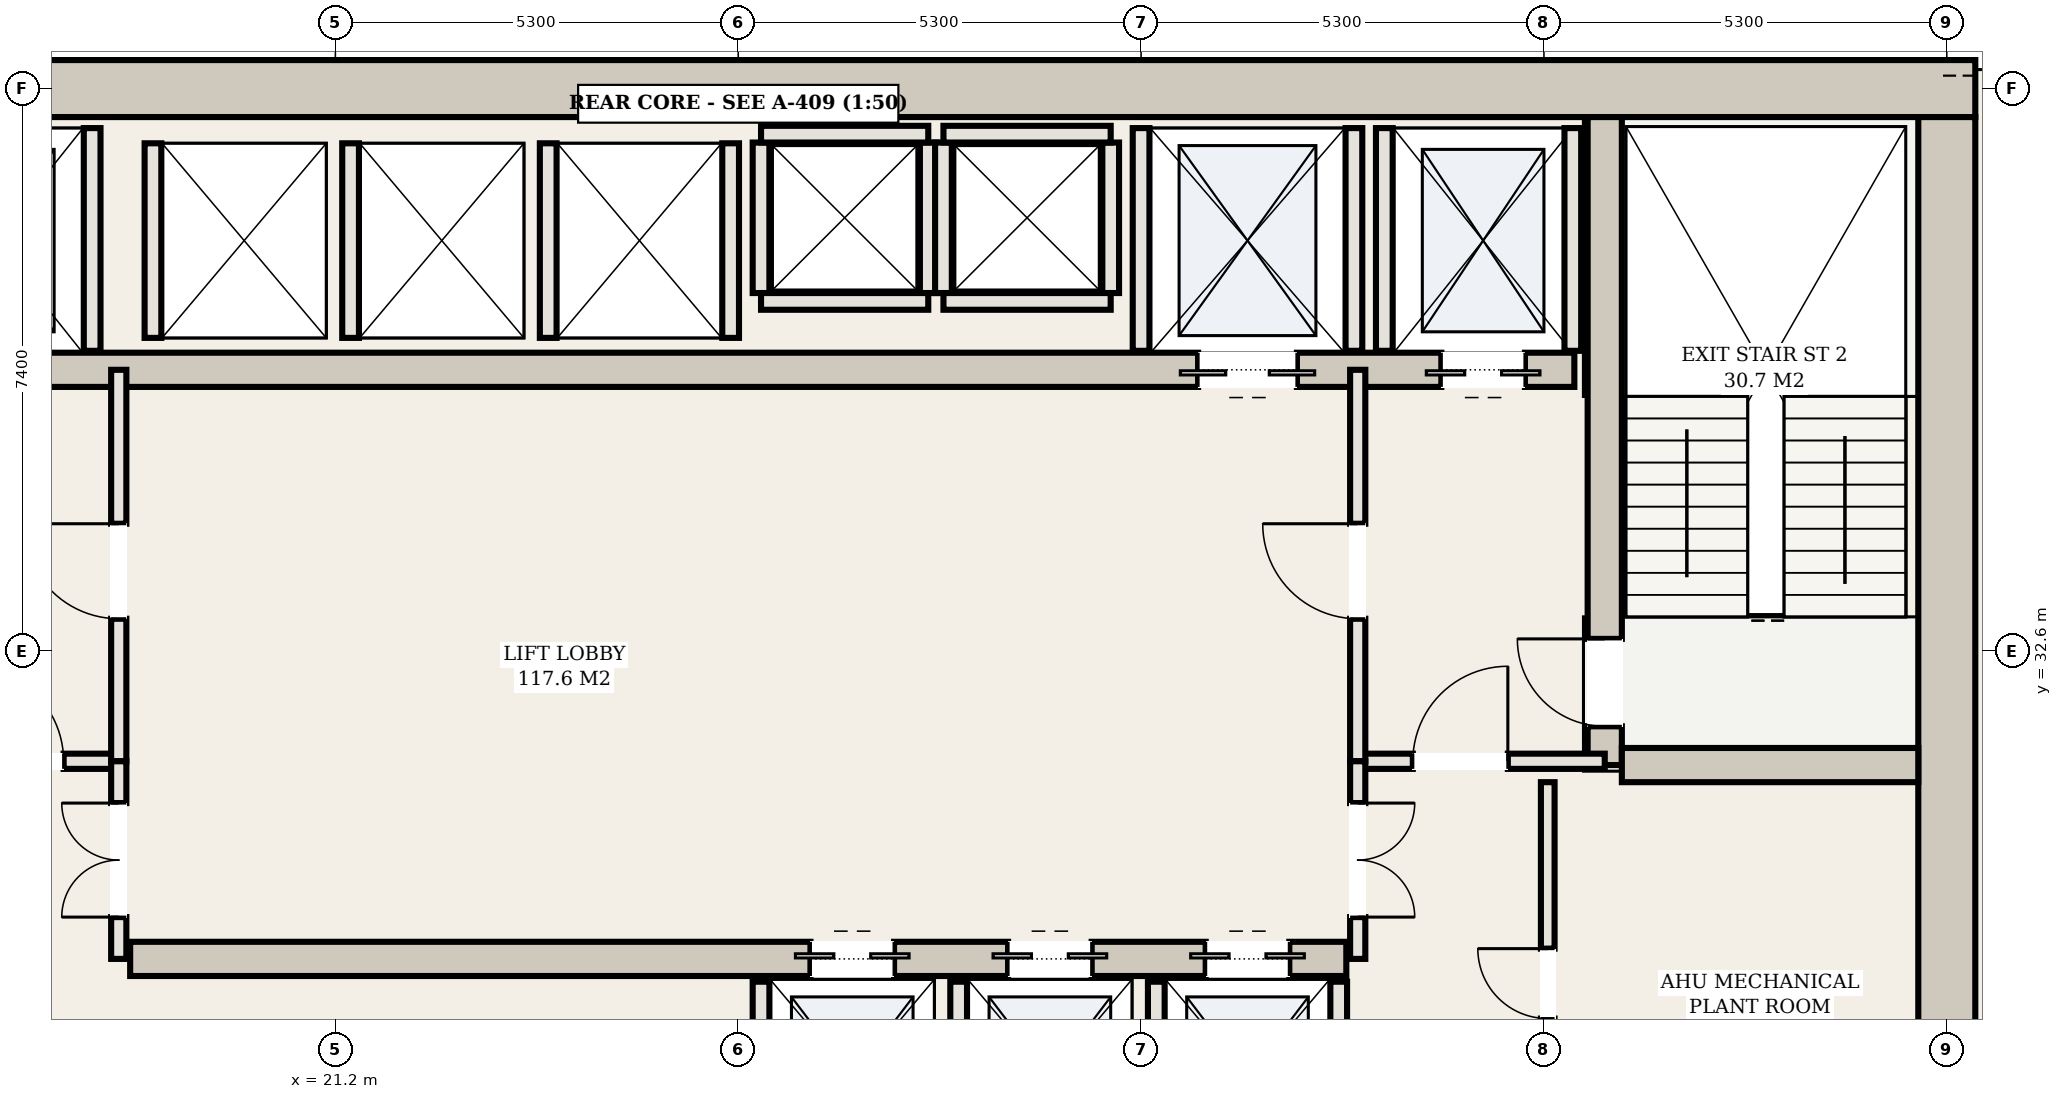
"""IFC4 building model, lengths in metres.
Left out: names, types, materials, properties, quantities, classifications, styles, units other than length and angle.
Written with IfcOpenShell. Run it as: python <this file> out.ifc"""

import sys

from ifc_helpers import new_model, si_unit, direction, frame, frame_2d, origin, place, context, subcontext, project, spatial, rectangle, extrude, element, fill, save


model = new_model("IFC4")
c1 = context("Model", 3, precision=1e-05, world=origin(), true_north=direction((0.0, 1.0)))
c2 = subcontext(c1, "Body", "Model", "MODEL_VIEW")
j1 = project(units=[si_unit("LENGTHUNIT", "METRE"), si_unit("PLANEANGLEUNIT", "RADIAN")], contexts=[c1])
p1 = place(None, origin())
s1 = spatial("IfcSite", under=j1, at=p1, CompositionType="ELEMENT")
p2 = place(p1, origin())
s2 = spatial("IfcBuilding", under=s1, at=p2, CompositionType="ELEMENT")
p3 = place(p2, frame((0.0, 0.0, 127.9)))
s3 = spatial("IfcBuildingStorey", under=s2, at=p3, CompositionType="ELEMENT", Elevation=127.9)
p4 = place(p3, frame((10.225, 40.0, 0.0), z_axis=(0.0, 0.0, 1.0), x_axis=(1.0, 0.0, 0.0)))
e1 = element("IfcWall", 1, at=p4, inside=s3, PredefinedType="SHEAR", context=c2, shape_type="SweptSolid", body=[
    extrude(rectangle(XDim=32.55, YDim=0.75, at=frame_2d((16.275, 0.0))), origin(), (0.0, 0.0, 1.0), 6.56),
])
p5 = place(p3, frame((42.4, 25.575, 0.0), z_axis=(0.0, 0.0, 1.0), x_axis=(0.0, 1.0, 0.0)))
e2 = element("IfcWall", 2, at=p5, inside=s3, PredefinedType="SHEAR", context=c2, shape_type="SweptSolid", body=[
    extrude(rectangle(XDim=14.05, YDim=0.75, at=frame_2d((7.025, 0.0))), origin(), (0.0, 0.0, 1.0), 6.56),
])
p6 = place(p3, frame((37.9, 31.1, 0.0), z_axis=(0.0, 0.0, 1.0), x_axis=(0.0, 1.0, 0.0)))
e3 = element("IfcWall", 3, at=p6, inside=s3, PredefinedType="SHEAR", context=c2, shape_type="SweptSolid", body=[
    extrude(rectangle(XDim=8.525, YDim=0.45, at=frame_2d((4.262, 0.0))), origin(), (0.0, 0.0, 1.0), 6.56),
])
p7 = place(p6, frame((0.51, 0.0, 0.0)))
e4 = element("IfcOpeningElement", 4, at=p7, cuts=e3, PredefinedType="OPENING", context=c2, shape_type="SweptSolid", body=[
    extrude(rectangle(XDim=1.15, YDim=2.2, at=frame_2d((0.575, 1.1))), frame((0.0, 0.235, 0.0), z_axis=(0.0, -1.0, 0.0), x_axis=(1.0, 0.0, 0.0)), (0.0, 0.0, 1.0), 0.47),
])
p8 = place(p3, frame((38.125, 31.1, 0.0), z_axis=(0.0, 0.0, 1.0), x_axis=(1.0, 0.0, 0.0)))
e5 = element("IfcWall", 5, at=p8, inside=s3, PredefinedType="SHEAR", context=c2, shape_type="SweptSolid", body=[
    extrude(rectangle(XDim=3.9, YDim=0.45, at=frame_2d((1.95, 0.0))), origin(), (0.0, 0.0, 1.0), 6.56),
])
p9 = place(p3, frame((15.5, 36.3, 0.0), z_axis=(0.0, 0.0, 1.0), x_axis=(1.0, 0.0, 0.0)))
e6 = element("IfcWall", 6, at=p9, inside=s3, PredefinedType="SHEAR", context=c2, shape_type="SweptSolid", body=[
    extrude(rectangle(XDim=22.0, YDim=0.45, at=frame_2d((11.0, 0.0))), origin(), (0.0, 0.0, 1.0), 6.56),
])
p10 = place(p9, frame((0.65, 0.0, 0.0)))
e7 = element("IfcOpeningElement", 7, at=p10, cuts=e6, PredefinedType="OPENING", context=c2, shape_type="SweptSolid", body=[
    extrude(rectangle(XDim=1.1, YDim=2.15, at=frame_2d((0.55, 1.075))), frame((0.0, 0.235, 0.0), z_axis=(0.0, -1.0, 0.0), x_axis=(1.0, 0.0, 0.0)), (0.0, 0.0, 1.0), 0.47),
])
p11 = place(p9, frame((20.25, 0.0, 0.0)))
e8 = element("IfcOpeningElement", 8, at=p11, cuts=e6, PredefinedType="OPENING", context=c2, shape_type="SweptSolid", body=[
    extrude(rectangle(XDim=1.1, YDim=2.15, at=frame_2d((0.55, 1.075))), frame((0.0, 0.235, 0.0), z_axis=(0.0, -1.0, 0.0), x_axis=(1.0, 0.0, 0.0)), (0.0, 0.0, 1.0), 0.47),
])
p12 = place(p9, frame((17.05, 0.0, 0.0)))
e9 = element("IfcOpeningElement", 9, at=p12, cuts=e6, PredefinedType="OPENING", context=c2, shape_type="SweptSolid", body=[
    extrude(rectangle(XDim=1.3, YDim=2.2, at=frame_2d((0.65, 1.1))), frame((0.0, 0.235, 0.0), z_axis=(0.0, -1.0, 0.0), x_axis=(1.0, 0.0, 0.0)), (0.0, 0.0, 1.0), 0.47),
])
p13 = place(p3, frame((18.5, 28.55, 0.0), z_axis=(0.0, 0.0, 1.0), x_axis=(1.0, 0.0, 0.0)))
e10 = element("IfcWall", 10, at=p13, inside=s3, PredefinedType="SHEAR", context=c2, shape_type="SweptSolid", body=[
    extrude(rectangle(XDim=16.0, YDim=0.45, at=frame_2d((8.0, 0.0))), origin(), (0.0, 0.0, 1.0), 6.56),
])
p14 = place(p13, frame((8.95, 0.0, 0.0)))
e11 = element("IfcOpeningElement", 11, at=p14, cuts=e10, PredefinedType="OPENING", context=c2, shape_type="SweptSolid", body=[
    extrude(rectangle(XDim=1.1, YDim=2.15, at=frame_2d((0.55, 1.075))), frame((0.0, 0.235, 0.0), z_axis=(0.0, -1.0, 0.0), x_axis=(1.0, 0.0, 0.0)), (0.0, 0.0, 1.0), 0.47),
])
p15 = place(p13, frame((11.55, 0.0, 0.0)))
e12 = element("IfcOpeningElement", 12, at=p15, cuts=e10, PredefinedType="OPENING", context=c2, shape_type="SweptSolid", body=[
    extrude(rectangle(XDim=1.1, YDim=2.15, at=frame_2d((0.55, 1.075))), frame((0.0, 0.235, 0.0), z_axis=(0.0, -1.0, 0.0), x_axis=(1.0, 0.0, 0.0)), (0.0, 0.0, 1.0), 0.47),
])
p16 = place(p13, frame((14.15, 0.0, 0.0)))
e13 = element("IfcOpeningElement", 13, at=p16, cuts=e10, PredefinedType="OPENING", context=c2, shape_type="SweptSolid", body=[
    extrude(rectangle(XDim=1.1, YDim=2.15, at=frame_2d((0.55, 1.075))), frame((0.0, 0.235, 0.0), z_axis=(0.0, -1.0, 0.0), x_axis=(1.0, 0.0, 0.0)), (0.0, 0.0, 1.0), 0.47),
])
for number, where, z_axis, x_axis in (
    (14, (18.0, 36.55, 0.0), (0.0, 0.0, 1.0), (0.0, 1.0, 0.0)),
    (15, (35.0, 36.55, 0.0), (0.0, 0.0, 1.0), (0.0, 1.0, 0.0)),
    (16, (37.48, 36.55, 0.0), (0.0, 0.0, 1.0), (0.0, 1.0, 0.0)),
    (17, (31.8, 36.55, 0.0), (0.0, 0.0, 1.0), (0.0, 1.0, 0.0)),
    (18, (34.6, 36.55, 0.0), (0.0, 0.0, 1.0), (0.0, 1.0, 0.0)),
):
    element("IfcWall", number, at=place(p3, frame(where, z_axis=z_axis, x_axis=x_axis)), inside=s3, PredefinedType="SOLIDWALL", context=c2, shape_type="SweptSolid", body=[
        extrude(rectangle(XDim=2.93, YDim=0.22, at=frame_2d((1.465, 0.0))), origin(), (0.0, 0.0, 1.0), 6.56),
    ])
for number, where, z_axis, x_axis in (
    (19, (26.8, 25.72, 0.0), (0.0, 0.0, 1.0), (0.0, 1.0, 0.0)),
    (20, (29.4, 25.72, 0.0), (0.0, 0.0, 1.0), (0.0, 1.0, 0.0)),
    (21, (32.0, 25.72, 0.0), (0.0, 0.0, 1.0), (0.0, 1.0, 0.0)),
    (22, (34.4, 25.72, 0.0), (0.0, 0.0, 1.0), (0.0, 1.0, 0.0)),
):
    element("IfcWall", number, at=place(p3, frame(where, z_axis=z_axis, x_axis=x_axis)), inside=s3, PredefinedType="SOLIDWALL", context=c2, shape_type="SweptSolid", body=[
        extrude(rectangle(XDim=2.53, YDim=0.22, at=frame_2d((1.265, 0.0))), origin(), (0.0, 0.0, 1.0), 6.56),
    ])
for number, where, z_axis, x_axis in (
    (23, (18.8, 36.72, 0.0), (0.0, 0.0, 1.0), (0.0, 1.0, 0.0)),
    (24, (21.4, 36.72, 0.0), (0.0, 0.0, 1.0), (0.0, 1.0, 0.0)),
    (25, (24.0, 36.72, 0.0), (0.0, 0.0, 1.0), (0.0, 1.0, 0.0)),
    (26, (26.4, 36.72, 0.0), (0.0, 0.0, 1.0), (0.0, 1.0, 0.0)),
):
    element("IfcWall", number, at=place(p3, frame(where, z_axis=z_axis, x_axis=x_axis)), inside=s3, PredefinedType="SOLIDWALL", context=c2, shape_type="SweptSolid", body=[
        extrude(rectangle(XDim=2.56, YDim=0.22, at=frame_2d((1.28, 0.0))), origin(), (0.0, 0.0, 1.0), 6.56),
    ])
for number, where, z_axis, x_axis in (
    (27, (26.8, 37.31, 0.0), (0.0, 0.0, 1.0), (0.0, 1.0, 0.0)),
    (28, (29.0, 37.31, 0.0), (0.0, 0.0, 1.0), (0.0, 1.0, 0.0)),
):
    element("IfcWall", number, at=place(p3, frame(where, z_axis=z_axis, x_axis=x_axis)), inside=s3, PredefinedType="SOLIDWALL", context=c2, shape_type="SweptSolid", body=[
        extrude(rectangle(XDim=1.98, YDim=0.22, at=frame_2d((0.99, 0.0))), origin(), (0.0, 0.0, 1.0), 6.56),
    ])
for number, where, z_axis, x_axis in (
    (29, (26.8, 39.4, 0.0), (0.0, 0.0, 1.0), (1.0, 0.0, 0.0)),
    (30, (26.8, 37.2, 0.0), (0.0, 0.0, 1.0), (1.0, 0.0, 0.0)),
):
    element("IfcWall", number, at=place(p3, frame(where, z_axis=z_axis, x_axis=x_axis)), inside=s3, PredefinedType="SOLIDWALL", context=c2, shape_type="SweptSolid", body=[
        extrude(rectangle(XDim=2.2, YDim=0.22, at=frame_2d((1.1, 0.0))), origin(), (0.0, 0.0, 1.0), 6.56),
    ])
for number, where, z_axis, x_axis in (
    (31, (29.2, 37.31, 0.0), (0.0, 0.0, 1.0), (0.0, 1.0, 0.0)),
    (32, (31.4, 37.31, 0.0), (0.0, 0.0, 1.0), (0.0, 1.0, 0.0)),
):
    element("IfcWall", number, at=place(p3, frame(where, z_axis=z_axis, x_axis=x_axis)), inside=s3, PredefinedType="SOLIDWALL", context=c2, shape_type="SweptSolid", body=[
        extrude(rectangle(XDim=1.98, YDim=0.22, at=frame_2d((0.99, 0.0))), origin(), (0.0, 0.0, 1.0), 6.56),
    ])
for number, where, z_axis, x_axis in (
    (33, (29.2, 39.4, 0.0), (0.0, 0.0, 1.0), (1.0, 0.0, 0.0)),
    (34, (29.2, 37.2, 0.0), (0.0, 0.0, 1.0), (1.0, 0.0, 0.0)),
):
    element("IfcWall", number, at=place(p3, frame(where, z_axis=z_axis, x_axis=x_axis)), inside=s3, PredefinedType="SOLIDWALL", context=c2, shape_type="SweptSolid", body=[
        extrude(rectangle(XDim=2.2, YDim=0.22, at=frame_2d((1.1, 0.0))), origin(), (0.0, 0.0, 1.0), 6.56),
    ])
p17 = place(p3, frame((15.1, 31.15, 0.0), z_axis=(0.0, 0.0, 1.0), x_axis=(1.0, 0.0, 0.0)))
e35 = element("IfcWall", 35, at=p17, inside=s3, PredefinedType="PARTITIONING", context=c2, shape_type="SweptSolid", body=[
    extrude(rectangle(XDim=3.25, YDim=0.2, at=frame_2d((1.625, 0.0))), origin(), (0.0, 0.0, 1.0), 6.56),
])
p18 = place(p17, frame((1.275, 0.0, 0.0)))
e36 = element("IfcOpeningElement", 36, at=p18, cuts=e35, PredefinedType="OPENING", context=c2, shape_type="SweptSolid", body=[
    extrude(rectangle(XDim=1.25, YDim=2.2, at=frame_2d((0.625, 1.1))), frame((0.0, 0.11, 0.0), z_axis=(0.0, -1.0, 0.0), x_axis=(1.0, 0.0, 0.0)), (0.0, 0.0, 1.0), 0.22),
])
p19 = place(p3, frame((18.35, 31.15, 0.0), z_axis=(0.0, 0.0, 1.0), x_axis=(0.0, 1.0, 0.0)))
e37 = element("IfcWall", 37, at=p19, inside=s3, PredefinedType="PARTITIONING", context=c2, shape_type="SweptSolid", body=[
    extrude(rectangle(XDim=5.15, YDim=0.2, at=frame_2d((2.575, 0.0))), origin(), (0.0, 0.0, 1.0), 6.56),
])
p20 = place(p19, frame((1.875, 0.0, 0.0)))
e38 = element("IfcOpeningElement", 38, at=p20, cuts=e37, PredefinedType="OPENING", context=c2, shape_type="SweptSolid", body=[
    extrude(rectangle(XDim=1.25, YDim=2.2, at=frame_2d((0.625, 1.1))), frame((0.0, 0.11, 0.0), z_axis=(0.0, -1.0, 0.0), x_axis=(1.0, 0.0, 0.0)), (0.0, 0.0, 1.0), 0.22),
])
p21 = place(p3, frame((34.65, 31.15, 0.0), z_axis=(0.0, 0.0, 1.0), x_axis=(1.0, 0.0, 0.0)))
e39 = element("IfcWall", 39, at=p21, inside=s3, PredefinedType="PARTITIONING", context=c2, shape_type="SweptSolid", body=[
    extrude(rectangle(XDim=3.25, YDim=0.2, at=frame_2d((1.625, 0.0))), origin(), (0.0, 0.0, 1.0), 6.56),
])
p22 = place(p21, frame((0.725, 0.0, 0.0)))
e40 = element("IfcOpeningElement", 40, at=p22, cuts=e39, PredefinedType="OPENING", context=c2, shape_type="SweptSolid", body=[
    extrude(rectangle(XDim=1.25, YDim=2.2, at=frame_2d((0.625, 1.1))), frame((0.0, 0.11, 0.0), z_axis=(0.0, -1.0, 0.0), x_axis=(1.0, 0.0, 0.0)), (0.0, 0.0, 1.0), 0.22),
])
p23 = place(p3, frame((34.65, 31.15, 0.0), z_axis=(0.0, 0.0, 1.0), x_axis=(0.0, 1.0, 0.0)))
e41 = element("IfcWall", 41, at=p23, inside=s3, PredefinedType="PARTITIONING", context=c2, shape_type="SweptSolid", body=[
    extrude(rectangle(XDim=5.15, YDim=0.2, at=frame_2d((2.575, 0.0))), origin(), (0.0, 0.0, 1.0), 6.56),
])
p24 = place(p23, frame((1.875, 0.0, 0.0)))
e42 = element("IfcOpeningElement", 42, at=p24, cuts=e41, PredefinedType="OPENING", context=c2, shape_type="SweptSolid", body=[
    extrude(rectangle(XDim=1.25, YDim=2.2, at=frame_2d((0.625, 1.1))), frame((0.0, 0.11, 0.0), z_axis=(0.0, -1.0, 0.0), x_axis=(1.0, 0.0, 0.0)), (0.0, 0.0, 1.0), 0.22),
])
p25 = place(p3, frame((37.15, 25.575, 0.0), z_axis=(0.0, 0.0, 1.0), x_axis=(0.0, 1.0, 0.0)))
e43 = element("IfcWall", 43, at=p25, inside=s3, PredefinedType="PARTITIONING", context=c2, shape_type="SweptSolid", body=[
    extrude(rectangle(XDim=5.3, YDim=0.18, at=frame_2d((2.65, 0.0))), origin(), (0.0, 0.0, 1.0), 5.055),
])
p26 = place(p25, frame((2.19, 0.0, 0.0)))
e44 = element("IfcOpeningElement", 44, at=p26, cuts=e43, PredefinedType="OPENING", context=c2, shape_type="SweptSolid", body=[
    extrude(rectangle(XDim=0.92, YDim=2.15, at=frame_2d((0.46, 1.075))), frame((0.0, 0.1, 0.0), z_axis=(0.0, -1.0, 0.0), x_axis=(1.0, 0.0, 0.0)), (0.0, 0.0, 1.0), 0.2),
])
p27 = place(p3, frame((18.35, 28.55, 0.0), z_axis=(0.0, 0.0, 1.0), x_axis=(0.0, 1.0, 0.0)))
e45 = element("IfcWall", 45, at=p27, inside=s3, PredefinedType="PARTITIONING", context=c2, shape_type="SweptSolid", body=[
    extrude(rectangle(XDim=2.6, YDim=0.2, at=frame_2d((1.3, 0.0))), origin(), (0.0, 0.0, 1.0), 6.56),
])
p28 = place(p27, frame((0.55, 0.0, 0.0)))
e46 = element("IfcOpeningElement", 46, at=p28, cuts=e45, PredefinedType="OPENING", context=c2, shape_type="SweptSolid", body=[
    extrude(rectangle(XDim=1.5, YDim=2.25, at=frame_2d((0.75, 1.125))), frame((0.0, 0.11, 0.0), z_axis=(0.0, -1.0, 0.0), x_axis=(1.0, 0.0, 0.0)), (0.0, 0.0, 1.0), 0.22),
])
p29 = place(p3, frame((34.65, 28.55, 0.0), z_axis=(0.0, 0.0, 1.0), x_axis=(0.0, 1.0, 0.0)))
e47 = element("IfcWall", 47, at=p29, inside=s3, PredefinedType="PARTITIONING", context=c2, shape_type="SweptSolid", body=[
    extrude(rectangle(XDim=2.6, YDim=0.2, at=frame_2d((1.3, 0.0))), origin(), (0.0, 0.0, 1.0), 6.56),
])
p30 = place(p29, frame((0.55, 0.0, 0.0)))
e48 = element("IfcOpeningElement", 48, at=p30, cuts=e47, PredefinedType="OPENING", context=c2, shape_type="SweptSolid", body=[
    extrude(rectangle(XDim=1.5, YDim=2.25, at=frame_2d((0.75, 1.125))), frame((0.0, 0.11, 0.0), z_axis=(0.0, -1.0, 0.0), x_axis=(1.0, 0.0, 0.0)), (0.0, 0.0, 1.0), 0.22),
])
p31 = place(p11, frame((1.1, 0.0, 0.0), z_axis=(0.0, 0.0, 1.0), x_axis=(-1.0, 0.0, 0.0)))
e49 = element("IfcDoor", 49, at=p31, inside=s3, OperationType="DOUBLE_DOOR_SLIDING", PredefinedType="DOOR", context=c2, shape_type="SweptSolid", body=[
    extrude(rectangle(XDim=1.1, YDim=2.15, at=frame_2d((0.55, 1.075))), frame((0.0, 0.025, 0.0), z_axis=(0.0, -1.0, 0.0), x_axis=(1.0, 0.0, 0.0)), (0.0, 0.0, 1.0), 0.05),
])
fill(e8, e49)
p32 = place(p12, frame((1.3, 0.0, 0.0), z_axis=(0.0, 0.0, 1.0), x_axis=(-1.0, 0.0, 0.0)))
e50 = element("IfcDoor", 50, at=p32, inside=s3, OperationType="DOUBLE_DOOR_SLIDING", PredefinedType="DOOR", context=c2, shape_type="SweptSolid", body=[
    extrude(rectangle(XDim=1.3, YDim=2.2, at=frame_2d((0.65, 1.1))), frame((0.0, 0.025, 0.0), z_axis=(0.0, -1.0, 0.0), x_axis=(1.0, 0.0, 0.0)), (0.0, 0.0, 1.0), 0.05),
])
fill(e9, e50)
p33 = place(p14, origin())
e51 = element("IfcDoor", 51, at=p33, inside=s3, OperationType="DOUBLE_DOOR_SLIDING", PredefinedType="DOOR", context=c2, shape_type="SweptSolid", body=[
    extrude(rectangle(XDim=1.1, YDim=2.15, at=frame_2d((0.55, 1.075))), frame((0.0, 0.025, 0.0), z_axis=(0.0, -1.0, 0.0), x_axis=(1.0, 0.0, 0.0)), (0.0, 0.0, 1.0), 0.05),
])
fill(e11, e51)
p34 = place(p15, origin())
e52 = element("IfcDoor", 52, at=p34, inside=s3, OperationType="DOUBLE_DOOR_SLIDING", PredefinedType="DOOR", context=c2, shape_type="SweptSolid", body=[
    extrude(rectangle(XDim=1.1, YDim=2.15, at=frame_2d((0.55, 1.075))), frame((0.0, 0.025, 0.0), z_axis=(0.0, -1.0, 0.0), x_axis=(1.0, 0.0, 0.0)), (0.0, 0.0, 1.0), 0.05),
])
fill(e12, e52)
p35 = place(p16, origin())
e53 = element("IfcDoor", 53, at=p35, inside=s3, OperationType="DOUBLE_DOOR_SLIDING", PredefinedType="DOOR", context=c2, shape_type="SweptSolid", body=[
    extrude(rectangle(XDim=1.1, YDim=2.15, at=frame_2d((0.55, 1.075))), frame((0.0, 0.025, 0.0), z_axis=(0.0, -1.0, 0.0), x_axis=(1.0, 0.0, 0.0)), (0.0, 0.0, 1.0), 0.05),
])
fill(e13, e53)
p36 = place(p18, origin())
e54 = element("IfcDoor", 54, at=p36, inside=s3, OperationType="SINGLE_SWING_LEFT", PredefinedType="DOOR", context=c2, shape_type="SweptSolid", body=[
    extrude(rectangle(XDim=1.25, YDim=2.2, at=frame_2d((0.625, 1.1))), frame((0.0, 0.025, 0.0), z_axis=(0.0, -1.0, 0.0), x_axis=(1.0, 0.0, 0.0)), (0.0, 0.0, 1.0), 0.05),
])
fill(e36, e54)
p37 = place(p20, origin())
e55 = element("IfcDoor", 55, at=p37, inside=s3, OperationType="SINGLE_SWING_RIGHT", PredefinedType="DOOR", context=c2, shape_type="SweptSolid", body=[
    extrude(rectangle(XDim=1.25, YDim=2.2, at=frame_2d((0.625, 1.1))), frame((0.0, 0.025, 0.0), z_axis=(0.0, -1.0, 0.0), x_axis=(1.0, 0.0, 0.0)), (0.0, 0.0, 1.0), 0.05),
])
fill(e38, e55)
p38 = place(p22, origin())
e56 = element("IfcDoor", 56, at=p38, inside=s3, OperationType="SINGLE_SWING_RIGHT", PredefinedType="DOOR", context=c2, shape_type="SweptSolid", body=[
    extrude(rectangle(XDim=1.25, YDim=2.2, at=frame_2d((0.625, 1.1))), frame((0.0, 0.025, 0.0), z_axis=(0.0, -1.0, 0.0), x_axis=(1.0, 0.0, 0.0)), (0.0, 0.0, 1.0), 0.05),
])
fill(e40, e56)
p39 = place(p24, origin())
e57 = element("IfcDoor", 57, at=p39, inside=s3, OperationType="SINGLE_SWING_RIGHT", PredefinedType="DOOR", context=c2, shape_type="SweptSolid", body=[
    extrude(rectangle(XDim=1.25, YDim=2.2, at=frame_2d((0.625, 1.1))), frame((0.0, 0.025, 0.0), z_axis=(0.0, -1.0, 0.0), x_axis=(1.0, 0.0, 0.0)), (0.0, 0.0, 1.0), 0.05),
])
fill(e42, e57)
p40 = place(p7, origin())
e58 = element("IfcDoor", 58, at=p40, inside=s3, OperationType="SINGLE_SWING_RIGHT", PredefinedType="DOOR", context=c2, shape_type="SweptSolid", body=[
    extrude(rectangle(XDim=1.15, YDim=2.2, at=frame_2d((0.575, 1.1))), frame((0.0, 0.025, 0.0), z_axis=(0.0, -1.0, 0.0), x_axis=(1.0, 0.0, 0.0)), (0.0, 0.0, 1.0), 0.05),
])
fill(e4, e58)
p41 = place(p26, origin())
e59 = element("IfcDoor", 59, at=p41, inside=s3, OperationType="SINGLE_SWING_RIGHT", PredefinedType="DOOR", context=c2, shape_type="SweptSolid", body=[
    extrude(rectangle(XDim=0.92, YDim=2.15, at=frame_2d((0.46, 1.075))), frame((0.0, 0.025, 0.0), z_axis=(0.0, -1.0, 0.0), x_axis=(1.0, 0.0, 0.0)), (0.0, 0.0, 1.0), 0.05),
])
fill(e44, e59)
p42 = place(p28, origin())
e60 = element("IfcDoor", 60, at=p42, inside=s3, OperationType="DOUBLE_DOOR_SINGLE_SWING", PredefinedType="DOOR", context=c2, shape_type="SweptSolid", body=[
    extrude(rectangle(XDim=1.5, YDim=2.25, at=frame_2d((0.75, 1.125))), frame((0.0, 0.025, 0.0), z_axis=(0.0, -1.0, 0.0), x_axis=(1.0, 0.0, 0.0)), (0.0, 0.0, 1.0), 0.05),
])
fill(e46, e60)
p43 = place(p30, frame((1.5, 0.0, 0.0), z_axis=(0.0, 0.0, 1.0), x_axis=(-1.0, 0.0, 0.0)))
e61 = element("IfcDoor", 61, at=p43, inside=s3, OperationType="DOUBLE_DOOR_SINGLE_SWING", PredefinedType="DOOR", context=c2, shape_type="SweptSolid", body=[
    extrude(rectangle(XDim=1.5, YDim=2.25, at=frame_2d((0.75, 1.125))), frame((0.0, 0.025, 0.0), z_axis=(0.0, -1.0, 0.0), x_axis=(1.0, 0.0, 0.0)), (0.0, 0.0, 1.0), 0.05),
])
fill(e48, e61)
save(model, sys.argv[1])
